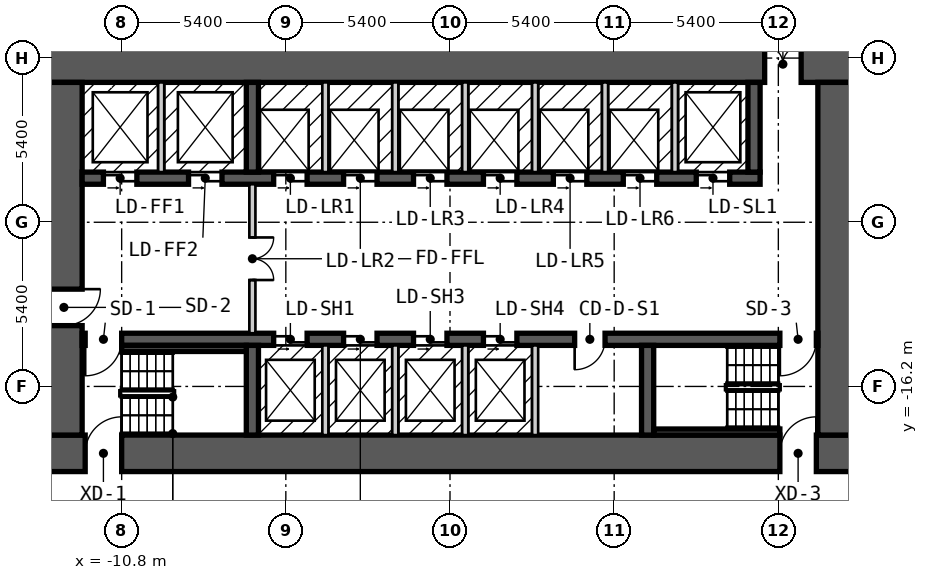
"""IFC4 building model, lengths in metres.
Left out: names, types, materials, properties, quantities, classifications, styles, units other than length and angle.
Written with IfcOpenShell. Run it as: python <this file> out.ifc"""

import sys

from ifc_helpers import new_model, si_unit, direction, frame, frame_2d, origin, place, context, subcontext, project, spatial, rectangle, extrude, element, fill, save


model = new_model("IFC4")
c1 = context("Model", 3, precision=1e-05, world=origin(), true_north=direction((0.0, 1.0)))
c2 = subcontext(c1, "Body", "Model", "MODEL_VIEW")
j1 = project(units=[si_unit("LENGTHUNIT", "METRE"), si_unit("PLANEANGLEUNIT", "RADIAN")], contexts=[c1])
p1 = place(None, origin())
s1 = spatial("IfcSite", under=j1, at=p1, CompositionType="ELEMENT")
p2 = place(p1, origin())
s2 = spatial("IfcBuilding", under=s1, at=p2, CompositionType="ELEMENT")
p3 = place(p2, origin())
s3 = spatial("IfcBuildingStorey", under=s2, at=p3, CompositionType="ELEMENT", Elevation=0.0)
p4 = place(p3, frame((-13.3, -18.4, 0.0), z_axis=(0.0, 0.0, 1.0), x_axis=(1.0, 0.0, 0.0)))
e1 = element("IfcWall", 1, at=p4, inside=s3, PredefinedType="SHEAR", context=c2, shape_type="SweptSolid", body=[
    extrude(rectangle(XDim=26.6, YDim=1.2, at=frame_2d((13.3, 0.0))), origin(), (0.0, 0.0, 1.0), 4.55),
])
p5 = place(p4, frame((2.5, 0.0, 0.0), z_axis=(0.0, 0.0, 1.0), x_axis=(-1.0, 0.0, 0.0)))
e2 = element("IfcOpeningElement", 2, at=p5, cuts=e1, PredefinedType="OPENING", context=c2, shape_type="SweptSolid", body=[
    extrude(rectangle(XDim=1.2, YDim=2.1, at=frame_2d((0.6, 1.05))), frame((0.0, 0.61, 0.0), z_axis=(0.0, -1.0, 0.0), x_axis=(1.0, 0.0, 0.0)), (0.0, 0.0, 1.0), 1.22),
])
p6 = place(p4, frame((25.35, 0.0, 0.0), z_axis=(0.0, 0.0, 1.0), x_axis=(-1.0, 0.0, 0.0)))
e3 = element("IfcOpeningElement", 3, at=p6, cuts=e1, PredefinedType="OPENING", context=c2, shape_type="SweptSolid", body=[
    extrude(rectangle(XDim=1.2, YDim=2.1, at=frame_2d((0.6, 1.05))), frame((0.0, 0.61, 0.0), z_axis=(0.0, -1.0, 0.0), x_axis=(1.0, 0.0, 0.0)), (0.0, 0.0, 1.0), 1.22),
])
p7 = place(p3, frame((-13.3, -5.6, 0.0), z_axis=(0.0, 0.0, 1.0), x_axis=(1.0, 0.0, 0.0)))
e4 = element("IfcWall", 4, at=p7, inside=s3, PredefinedType="SHEAR", context=c2, shape_type="SweptSolid", body=[
    extrude(rectangle(XDim=26.6, YDim=1.2, at=frame_2d((13.3, 0.0))), origin(), (0.0, 0.0, 1.0), 4.55),
])
p8 = place(p7, frame((23.65, 0.0, 0.0)))
e5 = element("IfcOpeningElement", 5, at=p8, cuts=e4, PredefinedType="OPENING", context=c2, shape_type="SweptSolid", body=[
    extrude(rectangle(XDim=1.2, YDim=2.1, at=frame_2d((0.6, 1.05))), frame((0.0, 0.61, 0.0), z_axis=(0.0, -1.0, 0.0), x_axis=(1.0, 0.0, 0.0)), (0.0, 0.0, 1.0), 1.22),
])
p9 = place(p3, frame((-12.7, -17.8, 0.0), z_axis=(0.0, 0.0, 1.0), x_axis=(0.0, 1.0, 0.0)))
e6 = element("IfcWall", 6, at=p9, inside=s3, PredefinedType="SHEAR", context=c2, shape_type="SweptSolid", body=[
    extrude(rectangle(XDim=11.6, YDim=1.2, at=frame_2d((5.8, 0.0))), origin(), (0.0, 0.0, 1.0), 4.55),
])
p10 = place(p9, frame((3.6, 0.0, 0.0)))
e7 = element("IfcOpeningElement", 7, at=p10, cuts=e6, PredefinedType="OPENING", context=c2, shape_type="SweptSolid", body=[
    extrude(rectangle(XDim=1.2, YDim=2.1, at=frame_2d((0.6, 1.05))), frame((0.0, 0.61, 0.0), z_axis=(0.0, -1.0, 0.0), x_axis=(1.0, 0.0, 0.0)), (0.0, 0.0, 1.0), 1.22),
])
p11 = place(p3, frame((12.7, -17.8, 0.0), z_axis=(0.0, 0.0, 1.0), x_axis=(0.0, 1.0, 0.0)))
e8 = element("IfcWall", 8, at=p11, inside=s3, PredefinedType="SHEAR", context=c2, shape_type="SweptSolid", body=[
    extrude(rectangle(XDim=11.6, YDim=1.2, at=frame_2d((5.8, 0.0))), origin(), (0.0, 0.0, 1.0), 4.55),
])
p12 = place(p3, frame((-12.1, -14.65, 0.0), z_axis=(0.0, 0.0, 1.0), x_axis=(1.0, 0.0, 0.0)))
e9 = element("IfcWall", 9, at=p12, inside=s3, PredefinedType="SHEAR", context=c2, shape_type="SweptSolid", body=[
    extrude(rectangle(XDim=24.2, YDim=0.4, at=frame_2d((12.1, 0.0))), origin(), (0.0, 0.0, 1.0), 4.55),
])
p13 = place(p12, frame((6.3, 0.0, 0.0)))
e10 = element("IfcOpeningElement", 10, at=p13, cuts=e9, PredefinedType="OPENING", context=c2, shape_type="SweptSolid", body=[
    extrude(rectangle(XDim=1.1, YDim=2.1, at=frame_2d((0.55, 1.05))), frame((0.0, 0.21, 0.0), z_axis=(0.0, -1.0, 0.0), x_axis=(1.0, 0.0, 0.0)), (0.0, 0.0, 1.0), 0.42),
])
p14 = place(p12, frame((8.6, 0.0, 0.0)))
e11 = element("IfcOpeningElement", 11, at=p14, cuts=e9, PredefinedType="OPENING", context=c2, shape_type="SweptSolid", body=[
    extrude(rectangle(XDim=1.1, YDim=2.1, at=frame_2d((0.55, 1.05))), frame((0.0, 0.21, 0.0), z_axis=(0.0, -1.0, 0.0), x_axis=(1.0, 0.0, 0.0)), (0.0, 0.0, 1.0), 0.42),
])
p15 = place(p12, frame((10.9, 0.0, 0.0)))
e12 = element("IfcOpeningElement", 12, at=p15, cuts=e9, PredefinedType="OPENING", context=c2, shape_type="SweptSolid", body=[
    extrude(rectangle(XDim=1.1, YDim=2.1, at=frame_2d((0.55, 1.05))), frame((0.0, 0.21, 0.0), z_axis=(0.0, -1.0, 0.0), x_axis=(1.0, 0.0, 0.0)), (0.0, 0.0, 1.0), 0.42),
])
p16 = place(p12, frame((13.2, 0.0, 0.0)))
e13 = element("IfcOpeningElement", 13, at=p16, cuts=e9, PredefinedType="OPENING", context=c2, shape_type="SweptSolid", body=[
    extrude(rectangle(XDim=1.1, YDim=2.1, at=frame_2d((0.55, 1.05))), frame((0.0, 0.21, 0.0), z_axis=(0.0, -1.0, 0.0), x_axis=(1.0, 0.0, 0.0)), (0.0, 0.0, 1.0), 0.42),
])
p17 = place(p12, frame((1.3, 0.0, 0.0), z_axis=(0.0, 0.0, 1.0), x_axis=(-1.0, 0.0, 0.0)))
e14 = element("IfcOpeningElement", 14, at=p17, cuts=e9, PredefinedType="OPENING", context=c2, shape_type="SweptSolid", body=[
    extrude(rectangle(XDim=1.2, YDim=2.1, at=frame_2d((0.6, 1.05))), frame((0.0, 0.21, 0.0), z_axis=(0.0, -1.0, 0.0), x_axis=(1.0, 0.0, 0.0)), (0.0, 0.0, 1.0), 0.42),
])
p18 = place(p12, frame((24.15, 0.0, 0.0), z_axis=(0.0, 0.0, 1.0), x_axis=(-1.0, 0.0, 0.0)))
e15 = element("IfcOpeningElement", 15, at=p18, cuts=e9, PredefinedType="OPENING", context=c2, shape_type="SweptSolid", body=[
    extrude(rectangle(XDim=1.2, YDim=2.1, at=frame_2d((0.6, 1.05))), frame((0.0, 0.21, 0.0), z_axis=(0.0, -1.0, 0.0), x_axis=(1.0, 0.0, 0.0)), (0.0, 0.0, 1.0), 0.42),
])
p19 = place(p12, frame((17.2, 0.0, 0.0), z_axis=(0.0, 0.0, 1.0), x_axis=(-1.0, 0.0, 0.0)))
e16 = element("IfcOpeningElement", 16, at=p19, cuts=e9, PredefinedType="OPENING", context=c2, shape_type="SweptSolid", body=[
    extrude(rectangle(XDim=1.0, YDim=2.1, at=frame_2d((0.5, 1.05))), frame((0.0, 0.21, 0.0), z_axis=(0.0, -1.0, 0.0), x_axis=(1.0, 0.0, 0.0)), (0.0, 0.0, 1.0), 0.42),
])
p20 = place(p3, frame((-12.1, -9.35, 0.0), z_axis=(0.0, 0.0, 1.0), x_axis=(1.0, 0.0, 0.0)))
e17 = element("IfcWall", 17, at=p20, inside=s3, PredefinedType="SHEAR", context=c2, shape_type="SweptSolid", body=[
    extrude(rectangle(XDim=22.3, YDim=0.4, at=frame_2d((11.15, 0.0))), origin(), (0.0, 0.0, 1.0), 4.55),
])
p21 = place(p20, frame((0.7, 0.0, 0.0)))
e18 = element("IfcOpeningElement", 18, at=p21, cuts=e17, PredefinedType="OPENING", context=c2, shape_type="SweptSolid", body=[
    extrude(rectangle(XDim=1.1, YDim=2.1, at=frame_2d((0.55, 1.05))), frame((0.0, 0.21, 0.0), z_axis=(0.0, -1.0, 0.0), x_axis=(1.0, 0.0, 0.0)), (0.0, 0.0, 1.0), 0.42),
])
p22 = place(p20, frame((3.5, 0.0, 0.0)))
e19 = element("IfcOpeningElement", 19, at=p22, cuts=e17, PredefinedType="OPENING", context=c2, shape_type="SweptSolid", body=[
    extrude(rectangle(XDim=1.1, YDim=2.1, at=frame_2d((0.55, 1.05))), frame((0.0, 0.21, 0.0), z_axis=(0.0, -1.0, 0.0), x_axis=(1.0, 0.0, 0.0)), (0.0, 0.0, 1.0), 0.42),
])
p23 = place(p20, frame((6.3, 0.0, 0.0)))
e20 = element("IfcOpeningElement", 20, at=p23, cuts=e17, PredefinedType="OPENING", context=c2, shape_type="SweptSolid", body=[
    extrude(rectangle(XDim=1.1, YDim=2.1, at=frame_2d((0.55, 1.05))), frame((0.0, 0.21, 0.0), z_axis=(0.0, -1.0, 0.0), x_axis=(1.0, 0.0, 0.0)), (0.0, 0.0, 1.0), 0.42),
])
p24 = place(p20, frame((8.6, 0.0, 0.0)))
e21 = element("IfcOpeningElement", 21, at=p24, cuts=e17, PredefinedType="OPENING", context=c2, shape_type="SweptSolid", body=[
    extrude(rectangle(XDim=1.1, YDim=2.1, at=frame_2d((0.55, 1.05))), frame((0.0, 0.21, 0.0), z_axis=(0.0, -1.0, 0.0), x_axis=(1.0, 0.0, 0.0)), (0.0, 0.0, 1.0), 0.42),
])
p25 = place(p20, frame((10.9, 0.0, 0.0)))
e22 = element("IfcOpeningElement", 22, at=p25, cuts=e17, PredefinedType="OPENING", context=c2, shape_type="SweptSolid", body=[
    extrude(rectangle(XDim=1.1, YDim=2.1, at=frame_2d((0.55, 1.05))), frame((0.0, 0.21, 0.0), z_axis=(0.0, -1.0, 0.0), x_axis=(1.0, 0.0, 0.0)), (0.0, 0.0, 1.0), 0.42),
])
p26 = place(p20, frame((13.2, 0.0, 0.0)))
e23 = element("IfcOpeningElement", 23, at=p26, cuts=e17, PredefinedType="OPENING", context=c2, shape_type="SweptSolid", body=[
    extrude(rectangle(XDim=1.1, YDim=2.1, at=frame_2d((0.55, 1.05))), frame((0.0, 0.21, 0.0), z_axis=(0.0, -1.0, 0.0), x_axis=(1.0, 0.0, 0.0)), (0.0, 0.0, 1.0), 0.42),
])
p27 = place(p20, frame((15.5, 0.0, 0.0)))
e24 = element("IfcOpeningElement", 24, at=p27, cuts=e17, PredefinedType="OPENING", context=c2, shape_type="SweptSolid", body=[
    extrude(rectangle(XDim=1.1, YDim=2.1, at=frame_2d((0.55, 1.05))), frame((0.0, 0.21, 0.0), z_axis=(0.0, -1.0, 0.0), x_axis=(1.0, 0.0, 0.0)), (0.0, 0.0, 1.0), 0.42),
])
p28 = place(p20, frame((17.8, 0.0, 0.0)))
e25 = element("IfcOpeningElement", 25, at=p28, cuts=e17, PredefinedType="OPENING", context=c2, shape_type="SweptSolid", body=[
    extrude(rectangle(XDim=1.1, YDim=2.1, at=frame_2d((0.55, 1.05))), frame((0.0, 0.21, 0.0), z_axis=(0.0, -1.0, 0.0), x_axis=(1.0, 0.0, 0.0)), (0.0, 0.0, 1.0), 0.42),
])
p29 = place(p20, frame((20.2, 0.0, 0.0)))
e26 = element("IfcOpeningElement", 26, at=p29, cuts=e17, PredefinedType="OPENING", context=c2, shape_type="SweptSolid", body=[
    extrude(rectangle(XDim=1.1, YDim=2.1, at=frame_2d((0.55, 1.05))), frame((0.0, 0.21, 0.0), z_axis=(0.0, -1.0, 0.0), x_axis=(1.0, 0.0, 0.0)), (0.0, 0.0, 1.0), 0.42),
])
for number, where, z_axis, x_axis in (
    (27, (-6.5, -17.8, 0.0), (0.0, 0.0, 1.0), (0.0, 1.0, 0.0)),
    (28, (6.5, -17.8, 0.0), (0.0, 0.0, 1.0), (0.0, 1.0, 0.0)),
    (29, (-6.5, -9.15, 0.0), (0.0, 0.0, 1.0), (0.0, 1.0, 0.0)),
    (30, (10.0, -9.15, 0.0), (0.0, 0.0, 1.0), (0.0, 1.0, 0.0)),
):
    element("IfcWall", number, at=place(p3, frame(where, z_axis=z_axis, x_axis=x_axis)), inside=s3, PredefinedType="SHEAR", context=c2, shape_type="SweptSolid", body=[
        extrude(rectangle(XDim=2.95, YDim=0.4, at=frame_2d((1.475, 0.0))), origin(), (0.0, 0.0, 1.0), 4.55),
    ])
p30 = place(p3, frame((-10.8, -14.95, 0.0), z_axis=(0.0, 0.0, 1.0), x_axis=(1.0, 0.0, 0.0)))
e31 = element("IfcWall", 31, at=p30, inside=s3, PredefinedType="SOLIDWALL", context=c2, shape_type="SweptSolid", body=[
    extrude(rectangle(XDim=4.1, YDim=0.2, at=frame_2d((2.05, 0.0))), origin(), (0.0, 0.0, 1.0), 4.55),
])
p31 = place(p3, frame((-9.5, -9.15, 0.0), z_axis=(0.0, 0.0, 1.0), x_axis=(0.0, 1.0, 0.0)))
e32 = element("IfcWall", 32, at=p31, inside=s3, PredefinedType="SOLIDWALL", context=c2, shape_type="SweptSolid", body=[
    extrude(rectangle(XDim=2.95, YDim=0.2, at=frame_2d((1.475, 0.0))), origin(), (0.0, 0.0, 1.0), 4.55),
])
p32 = place(p3, frame((-6.5, -14.45, 0.0), z_axis=(0.0, 0.0, 1.0), x_axis=(0.0, 1.0, 0.0)))
e33 = element("IfcWall", 33, at=p32, inside=s3, PredefinedType="PARTITIONING", context=c2, shape_type="SweptSolid", body=[
    extrude(rectangle(XDim=4.9, YDim=0.2, at=frame_2d((2.45, 0.0))), origin(), (0.0, 0.0, 1.0), 4.55),
])
p33 = place(p32, frame((3.15, 0.0, 0.0), z_axis=(0.0, 0.0, 1.0), x_axis=(-1.0, 0.0, 0.0)))
e34 = element("IfcOpeningElement", 34, at=p33, cuts=e33, PredefinedType="OPENING", context=c2, shape_type="SweptSolid", body=[
    extrude(rectangle(XDim=1.4, YDim=2.1, at=frame_2d((0.7, 1.05))), frame((0.0, 0.11, 0.0), z_axis=(0.0, -1.0, 0.0), x_axis=(1.0, 0.0, 0.0)), (0.0, 0.0, 1.0), 0.22),
])
for number, where, z_axis, x_axis in (
    (35, (-4.1, -17.8, 0.0), (0.0, 0.0, 1.0), (0.0, 1.0, 0.0)),
    (36, (-4.1, -9.15, 0.0), (0.0, 0.0, 1.0), (0.0, 1.0, 0.0)),
    (37, (-1.8, -17.8, 0.0), (0.0, 0.0, 1.0), (0.0, 1.0, 0.0)),
    (38, (-1.8, -9.15, 0.0), (0.0, 0.0, 1.0), (0.0, 1.0, 0.0)),
    (39, (0.5, -17.8, 0.0), (0.0, 0.0, 1.0), (0.0, 1.0, 0.0)),
    (40, (0.5, -9.15, 0.0), (0.0, 0.0, 1.0), (0.0, 1.0, 0.0)),
    (41, (2.8, -17.8, 0.0), (0.0, 0.0, 1.0), (0.0, 1.0, 0.0)),
    (42, (2.8, -9.15, 0.0), (0.0, 0.0, 1.0), (0.0, 1.0, 0.0)),
    (43, (5.1, -9.15, 0.0), (0.0, 0.0, 1.0), (0.0, 1.0, 0.0)),
):
    element("IfcWall", number, at=place(p3, frame(where, z_axis=z_axis, x_axis=x_axis)), inside=s3, PredefinedType="SOLIDWALL", context=c2, shape_type="SweptSolid", body=[
        extrude(rectangle(XDim=2.95, YDim=0.2, at=frame_2d((1.475, 0.0))), origin(), (0.0, 0.0, 1.0), 4.55),
    ])
p34 = place(p3, frame((6.7, -17.7, 0.0), z_axis=(0.0, 0.0, 1.0), x_axis=(1.0, 0.0, 0.0)))
e44 = element("IfcWall", 44, at=p34, inside=s3, PredefinedType="SOLIDWALL", context=c2, shape_type="SweptSolid", body=[
    extrude(rectangle(XDim=4.15, YDim=0.2, at=frame_2d((2.075, 0.0))), origin(), (0.0, 0.0, 1.0), 4.55),
])
p35 = place(p3, frame((7.4, -9.15, 0.0), z_axis=(0.0, 0.0, 1.0), x_axis=(0.0, 1.0, 0.0)))
e45 = element("IfcWall", 45, at=p35, inside=s3, PredefinedType="SOLIDWALL", context=c2, shape_type="SweptSolid", body=[
    extrude(rectangle(XDim=2.95, YDim=0.2, at=frame_2d((1.475, 0.0))), origin(), (0.0, 0.0, 1.0), 4.55),
])
p36 = place(p21, origin())
e46 = element("IfcDoor", 46, at=p36, inside=s3, OperationType="DOUBLE_DOOR_SLIDING", PredefinedType="DOOR", context=c2, shape_type="SweptSolid", body=[
    extrude(rectangle(XDim=1.1, YDim=2.1, at=frame_2d((0.55, 1.05))), frame((0.0, 0.025, 0.0), z_axis=(0.0, -1.0, 0.0), x_axis=(1.0, 0.0, 0.0)), (0.0, 0.0, 1.0), 0.05),
])
fill(e18, e46)
p37 = place(p22, origin())
e47 = element("IfcDoor", 47, at=p37, inside=s3, OperationType="DOUBLE_DOOR_SLIDING", PredefinedType="DOOR", context=c2, shape_type="SweptSolid", body=[
    extrude(rectangle(XDim=1.1, YDim=2.1, at=frame_2d((0.55, 1.05))), frame((0.0, 0.025, 0.0), z_axis=(0.0, -1.0, 0.0), x_axis=(1.0, 0.0, 0.0)), (0.0, 0.0, 1.0), 0.05),
])
fill(e19, e47)
p38 = place(p23, origin())
e48 = element("IfcDoor", 48, at=p38, inside=s3, OperationType="DOUBLE_DOOR_SLIDING", PredefinedType="DOOR", context=c2, shape_type="SweptSolid", body=[
    extrude(rectangle(XDim=1.1, YDim=2.1, at=frame_2d((0.55, 1.05))), frame((0.0, 0.025, 0.0), z_axis=(0.0, -1.0, 0.0), x_axis=(1.0, 0.0, 0.0)), (0.0, 0.0, 1.0), 0.05),
])
fill(e20, e48)
p39 = place(p24, origin())
e49 = element("IfcDoor", 49, at=p39, inside=s3, OperationType="DOUBLE_DOOR_SLIDING", PredefinedType="DOOR", context=c2, shape_type="SweptSolid", body=[
    extrude(rectangle(XDim=1.1, YDim=2.1, at=frame_2d((0.55, 1.05))), frame((0.0, 0.025, 0.0), z_axis=(0.0, -1.0, 0.0), x_axis=(1.0, 0.0, 0.0)), (0.0, 0.0, 1.0), 0.05),
])
fill(e21, e49)
p40 = place(p25, origin())
e50 = element("IfcDoor", 50, at=p40, inside=s3, OperationType="DOUBLE_DOOR_SLIDING", PredefinedType="DOOR", context=c2, shape_type="SweptSolid", body=[
    extrude(rectangle(XDim=1.1, YDim=2.1, at=frame_2d((0.55, 1.05))), frame((0.0, 0.025, 0.0), z_axis=(0.0, -1.0, 0.0), x_axis=(1.0, 0.0, 0.0)), (0.0, 0.0, 1.0), 0.05),
])
fill(e22, e50)
p41 = place(p26, origin())
e51 = element("IfcDoor", 51, at=p41, inside=s3, OperationType="DOUBLE_DOOR_SLIDING", PredefinedType="DOOR", context=c2, shape_type="SweptSolid", body=[
    extrude(rectangle(XDim=1.1, YDim=2.1, at=frame_2d((0.55, 1.05))), frame((0.0, 0.025, 0.0), z_axis=(0.0, -1.0, 0.0), x_axis=(1.0, 0.0, 0.0)), (0.0, 0.0, 1.0), 0.05),
])
fill(e23, e51)
p42 = place(p27, origin())
e52 = element("IfcDoor", 52, at=p42, inside=s3, OperationType="DOUBLE_DOOR_SLIDING", PredefinedType="DOOR", context=c2, shape_type="SweptSolid", body=[
    extrude(rectangle(XDim=1.1, YDim=2.1, at=frame_2d((0.55, 1.05))), frame((0.0, 0.025, 0.0), z_axis=(0.0, -1.0, 0.0), x_axis=(1.0, 0.0, 0.0)), (0.0, 0.0, 1.0), 0.05),
])
fill(e24, e52)
p43 = place(p28, origin())
e53 = element("IfcDoor", 53, at=p43, inside=s3, OperationType="DOUBLE_DOOR_SLIDING", PredefinedType="DOOR", context=c2, shape_type="SweptSolid", body=[
    extrude(rectangle(XDim=1.1, YDim=2.1, at=frame_2d((0.55, 1.05))), frame((0.0, 0.025, 0.0), z_axis=(0.0, -1.0, 0.0), x_axis=(1.0, 0.0, 0.0)), (0.0, 0.0, 1.0), 0.05),
])
fill(e25, e53)
p44 = place(p29, origin())
e54 = element("IfcDoor", 54, at=p44, inside=s3, OperationType="DOUBLE_DOOR_SLIDING", PredefinedType="DOOR", context=c2, shape_type="SweptSolid", body=[
    extrude(rectangle(XDim=1.1, YDim=2.1, at=frame_2d((0.55, 1.05))), frame((0.0, 0.025, 0.0), z_axis=(0.0, -1.0, 0.0), x_axis=(1.0, 0.0, 0.0)), (0.0, 0.0, 1.0), 0.05),
])
fill(e26, e54)
p45 = place(p13, origin())
e55 = element("IfcDoor", 55, at=p45, inside=s3, OperationType="DOUBLE_DOOR_SLIDING", PredefinedType="DOOR", context=c2, shape_type="SweptSolid", body=[
    extrude(rectangle(XDim=1.1, YDim=2.1, at=frame_2d((0.55, 1.05))), frame((0.0, 0.025, 0.0), z_axis=(0.0, -1.0, 0.0), x_axis=(1.0, 0.0, 0.0)), (0.0, 0.0, 1.0), 0.05),
])
fill(e10, e55)
p46 = place(p14, origin())
e56 = element("IfcDoor", 56, at=p46, inside=s3, OperationType="DOUBLE_DOOR_SLIDING", PredefinedType="DOOR", context=c2, shape_type="SweptSolid", body=[
    extrude(rectangle(XDim=1.1, YDim=2.1, at=frame_2d((0.55, 1.05))), frame((0.0, 0.025, 0.0), z_axis=(0.0, -1.0, 0.0), x_axis=(1.0, 0.0, 0.0)), (0.0, 0.0, 1.0), 0.05),
])
fill(e11, e56)
p47 = place(p15, origin())
e57 = element("IfcDoor", 57, at=p47, inside=s3, OperationType="DOUBLE_DOOR_SLIDING", PredefinedType="DOOR", context=c2, shape_type="SweptSolid", body=[
    extrude(rectangle(XDim=1.1, YDim=2.1, at=frame_2d((0.55, 1.05))), frame((0.0, 0.025, 0.0), z_axis=(0.0, -1.0, 0.0), x_axis=(1.0, 0.0, 0.0)), (0.0, 0.0, 1.0), 0.05),
])
fill(e12, e57)
p48 = place(p16, origin())
e58 = element("IfcDoor", 58, at=p48, inside=s3, OperationType="DOUBLE_DOOR_SLIDING", PredefinedType="DOOR", context=c2, shape_type="SweptSolid", body=[
    extrude(rectangle(XDim=1.1, YDim=2.1, at=frame_2d((0.55, 1.05))), frame((0.0, 0.025, 0.0), z_axis=(0.0, -1.0, 0.0), x_axis=(1.0, 0.0, 0.0)), (0.0, 0.0, 1.0), 0.05),
])
fill(e13, e58)
p49 = place(p17, origin())
e59 = element("IfcDoor", 59, at=p49, inside=s3, OperationType="SINGLE_SWING_RIGHT", PredefinedType="DOOR", context=c2, shape_type="SweptSolid", body=[
    extrude(rectangle(XDim=1.2, YDim=2.1, at=frame_2d((0.6, 1.05))), frame((0.0, 0.025, 0.0), z_axis=(0.0, -1.0, 0.0), x_axis=(1.0, 0.0, 0.0)), (0.0, 0.0, 1.0), 0.05),
])
fill(e14, e59)
p50 = place(p18, origin())
e60 = element("IfcDoor", 60, at=p50, inside=s3, OperationType="SINGLE_SWING_RIGHT", PredefinedType="DOOR", context=c2, shape_type="SweptSolid", body=[
    extrude(rectangle(XDim=1.2, YDim=2.1, at=frame_2d((0.6, 1.05))), frame((0.0, 0.025, 0.0), z_axis=(0.0, -1.0, 0.0), x_axis=(1.0, 0.0, 0.0)), (0.0, 0.0, 1.0), 0.05),
])
fill(e15, e60)
p51 = place(p10, origin())
e61 = element("IfcDoor", 61, at=p51, inside=s3, OperationType="SINGLE_SWING_RIGHT", PredefinedType="DOOR", context=c2, shape_type="SweptSolid", body=[
    extrude(rectangle(XDim=1.2, YDim=2.1, at=frame_2d((0.6, 1.05))), frame((0.0, 0.025, 0.0), z_axis=(0.0, -1.0, 0.0), x_axis=(1.0, 0.0, 0.0)), (0.0, 0.0, 1.0), 0.05),
])
fill(e7, e61)
p52 = place(p33, origin())
e62 = element("IfcDoor", 62, at=p52, inside=s3, OperationType="DOUBLE_DOOR_SINGLE_SWING", PredefinedType="DOOR", context=c2, shape_type="SweptSolid", body=[
    extrude(rectangle(XDim=1.4, YDim=2.1, at=frame_2d((0.7, 1.05))), frame((0.0, 0.025, 0.0), z_axis=(0.0, -1.0, 0.0), x_axis=(1.0, 0.0, 0.0)), (0.0, 0.0, 1.0), 0.05),
])
fill(e34, e62)
p53 = place(p8, origin())
e63 = element("IfcDoor", 63, at=p53, inside=s3, OperationType="DOUBLE_DOOR_SINGLE_SWING", PredefinedType="DOOR", context=c2, shape_type="SweptSolid", body=[
    extrude(rectangle(XDim=1.2, YDim=2.1, at=frame_2d((0.6, 1.05))), frame((0.0, 0.025, 0.0), z_axis=(0.0, -1.0, 0.0), x_axis=(1.0, 0.0, 0.0)), (0.0, 0.0, 1.0), 0.05),
])
fill(e5, e63)
p54 = place(p19, origin())
e64 = element("IfcDoor", 64, at=p54, inside=s3, OperationType="SINGLE_SWING_RIGHT", PredefinedType="DOOR", context=c2, shape_type="SweptSolid", body=[
    extrude(rectangle(XDim=1.0, YDim=2.1, at=frame_2d((0.5, 1.05))), frame((0.0, 0.025, 0.0), z_axis=(0.0, -1.0, 0.0), x_axis=(1.0, 0.0, 0.0)), (0.0, 0.0, 1.0), 0.05),
])
fill(e16, e64)
p55 = place(p5, origin())
e65 = element("IfcDoor", 65, at=p55, inside=s3, OperationType="SINGLE_SWING_LEFT", PredefinedType="DOOR", context=c2, shape_type="SweptSolid", body=[
    extrude(rectangle(XDim=1.2, YDim=2.1, at=frame_2d((0.6, 1.05))), frame((0.0, 0.59, 0.0), z_axis=(0.0, -1.0, 0.0), x_axis=(1.0, 0.0, 0.0)), (0.0, 0.0, 1.0), 0.05),
])
fill(e2, e65)
p56 = place(p6, origin())
e66 = element("IfcDoor", 66, at=p56, inside=s3, OperationType="SINGLE_SWING_LEFT", PredefinedType="DOOR", context=c2, shape_type="SweptSolid", body=[
    extrude(rectangle(XDim=1.2, YDim=2.1, at=frame_2d((0.6, 1.05))), frame((0.0, 0.59, 0.0), z_axis=(0.0, -1.0, 0.0), x_axis=(1.0, 0.0, 0.0)), (0.0, 0.0, 1.0), 0.05),
])
fill(e3, e66)
save(model, sys.argv[1])
